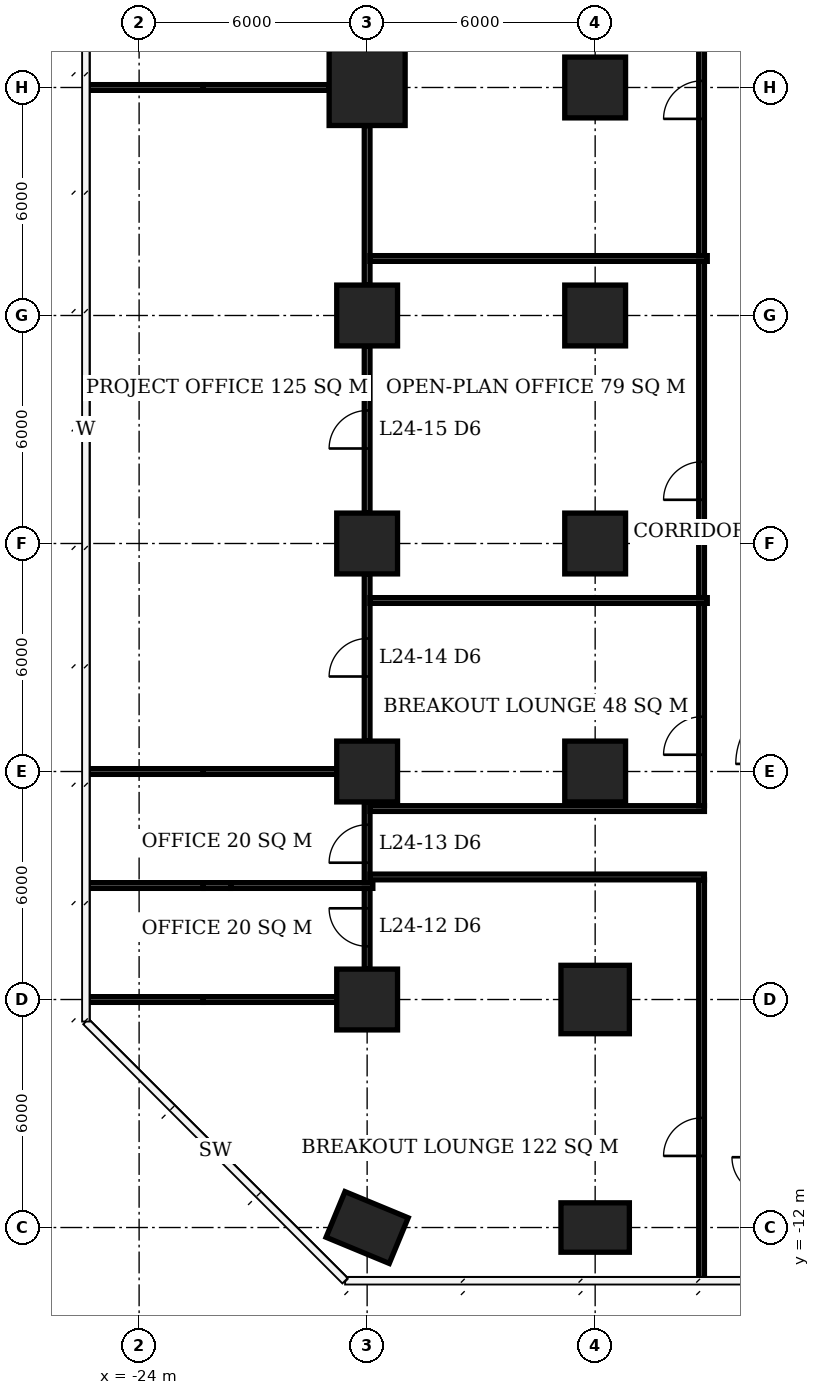
"""IFC4 building model, lengths in metres.
Left out: names, types, materials, properties, quantities, classifications, styles, units other than length and angle.
Written with IfcOpenShell. Run it as: python <this file> out.ifc"""

import sys

from ifc_helpers import new_model, si_unit, direction, frame, frame_2d, origin, origin_2d, place, context, subcontext, project, spatial, rectangle, extrude, element, fill, save


model = new_model("IFC4")
c1 = context("Model", 3, precision=1e-05, world=origin(), true_north=direction((0.0, 1.0)))
c2 = subcontext(c1, "Body", "Model", "MODEL_VIEW")
j1 = project(units=[si_unit("LENGTHUNIT", "METRE"), si_unit("PLANEANGLEUNIT", "RADIAN")], contexts=[c1])
p1 = place(None, origin())
s1 = spatial("IfcSite", under=j1, at=p1, CompositionType="ELEMENT")
p2 = place(p1, origin())
s2 = spatial("IfcBuilding", under=s1, at=p2, CompositionType="ELEMENT")
p3 = place(p2, frame((0.0, 0.0, 101.6)))
s3 = spatial("IfcBuildingStorey", under=s2, at=p3, CompositionType="ELEMENT", Elevation=101.6)
p4 = place(p3, frame((-18.0, -12.0, 0.0), z_axis=(0.0, 0.0, 1.0), x_axis=(-0.923879532511, 0.382683432365, 0.0)))
e1 = element("IfcColumn", 1, at=p4, inside=s3, PredefinedType="COLUMN", context=c2, shape_type="SweptSolid", body=[
    extrude(rectangle(XDim=1.8, YDim=1.3, at=origin_2d()), origin(), (0.0, 0.0, 1.0), 3.9),
])
for number, where, z_axis, x_axis in (
    (2, (-18.0, -6.0, 0.0), (0.0, 0.0, 1.0), (1.0, 0.0, 0.0)),
    (3, (-18.0, 0.0, 0.0), (0.0, 0.0, 1.0), (1.0, 0.0, 0.0)),
    (4, (-18.0, 6.0, 0.0), (0.0, 0.0, 1.0), (1.0, 0.0, 0.0)),
    (5, (-18.0, 12.0, 0.0), (0.0, 0.0, 1.0), (1.0, 0.0, 0.0)),
):
    element("IfcColumn", number, at=place(p3, frame(where, z_axis=z_axis, x_axis=x_axis)), inside=s3, PredefinedType="COLUMN", context=c2, shape_type="SweptSolid", body=[
        extrude(rectangle(XDim=1.6, YDim=1.6, at=origin_2d()), origin(), (0.0, 0.0, 1.0), 3.9),
    ])
p5 = place(p3, frame((-18.0, 18.0, 0.0), z_axis=(0.0, 0.0, 1.0), x_axis=(1.0, 0.0, 0.0)))
e6 = element("IfcColumn", 6, at=p5, inside=s3, PredefinedType="COLUMN", context=c2, shape_type="SweptSolid", body=[
    extrude(rectangle(XDim=2.0, YDim=2.0, at=origin_2d()), origin(), (0.0, 0.0, 1.0), 3.9),
])
p6 = place(p3, frame((-12.0, -12.0, 0.0), z_axis=(0.0, 0.0, 1.0), x_axis=(1.0, 0.0, 0.0)))
e7 = element("IfcColumn", 7, at=p6, inside=s3, PredefinedType="COLUMN", context=c2, shape_type="SweptSolid", body=[
    extrude(rectangle(XDim=1.8, YDim=1.3, at=origin_2d()), origin(), (0.0, 0.0, 1.0), 3.9),
])
p7 = place(p3, frame((-12.0, -6.0, 0.0), z_axis=(0.0, 0.0, 1.0), x_axis=(1.0, 0.0, 0.0)))
e8 = element("IfcColumn", 8, at=p7, inside=s3, PredefinedType="COLUMN", context=c2, shape_type="SweptSolid", body=[
    extrude(rectangle(XDim=1.8, YDim=1.8, at=origin_2d()), origin(), (0.0, 0.0, 1.0), 3.9),
])
for number, where, z_axis, x_axis in (
    (9, (-12.0, 0.0, 0.0), (0.0, 0.0, 1.0), (1.0, 0.0, 0.0)),
    (10, (-12.0, 6.0, 0.0), (0.0, 0.0, 1.0), (1.0, 0.0, 0.0)),
    (11, (-12.0, 12.0, 0.0), (0.0, 0.0, 1.0), (1.0, 0.0, 0.0)),
    (12, (-12.0, 18.0, 0.0), (0.0, 0.0, 1.0), (1.0, 0.0, 0.0)),
):
    element("IfcColumn", number, at=place(p3, frame(where, z_axis=z_axis, x_axis=x_axis)), inside=s3, PredefinedType="COLUMN", context=c2, shape_type="SweptSolid", body=[
        extrude(rectangle(XDim=1.6, YDim=1.6, at=origin_2d()), origin(), (0.0, 0.0, 1.0), 3.9),
    ])
p8 = place(p3, frame((-25.4, -6.0, 0.0), z_axis=(0.0, 0.0, 1.0), x_axis=(1.0, 0.0, 0.0)))
e13 = element("IfcWall", 13, at=p8, inside=s3, PredefinedType="PARTITIONING", context=c2, shape_type="SweptSolid", body=[
    extrude(rectangle(XDim=3.09, YDim=0.15, at=frame_2d((1.545, 0.0))), origin(), (0.0, 0.0, 1.0), 3.65),
])
p9 = place(p3, frame((-22.31, -6.0, 0.0), z_axis=(0.0, 0.0, 1.0), x_axis=(1.0, 0.0, 0.0)))
e14 = element("IfcWall", 14, at=p9, inside=s3, PredefinedType="PARTITIONING", context=c2, shape_type="SweptSolid", body=[
    extrude(rectangle(XDim=3.51, YDim=0.15, at=frame_2d((1.755, 0.0))), origin(), (0.0, 0.0, 1.0), 2.65),
])
p10 = place(p3, frame((-25.4, -3.0, 0.0), z_axis=(0.0, 0.0, 1.0), x_axis=(1.0, 0.0, 0.0)))
e15 = element("IfcWall", 15, at=p10, inside=s3, PredefinedType="PARTITIONING", context=c2, shape_type="SweptSolid", body=[
    extrude(rectangle(XDim=3.09, YDim=0.15, at=frame_2d((1.545, 0.0))), origin(), (0.0, 0.0, 1.0), 3.65),
])
p11 = place(p3, frame((-22.31, -3.0, 0.0), z_axis=(0.0, 0.0, 1.0), x_axis=(1.0, 0.0, 0.0)))
e16 = element("IfcWall", 16, at=p11, inside=s3, PredefinedType="PARTITIONING", context=c2, shape_type="SweptSolid", body=[
    extrude(rectangle(XDim=0.72, YDim=0.15, at=frame_2d((0.36, 0.0))), origin(), (0.0, 0.0, 1.0), 2.65),
])
p12 = place(p3, frame((-21.59, -3.0, 0.0), z_axis=(0.0, 0.0, 1.0), x_axis=(1.0, 0.0, 0.0)))
e17 = element("IfcWall", 17, at=p12, inside=s3, PredefinedType="PARTITIONING", context=c2, shape_type="SweptSolid", body=[
    extrude(rectangle(XDim=3.74, YDim=0.15, at=frame_2d((1.87, 0.0))), origin(), (0.0, 0.0, 1.0), 3.65),
])
p13 = place(p3, frame((-25.4, 0.0, 0.0), z_axis=(0.0, 0.0, 1.0), x_axis=(1.0, 0.0, 0.0)))
e18 = element("IfcWall", 18, at=p13, inside=s3, PredefinedType="PARTITIONING", context=c2, shape_type="SweptSolid", body=[
    extrude(rectangle(XDim=3.09, YDim=0.15, at=frame_2d((1.545, 0.0))), origin(), (0.0, 0.0, 1.0), 3.65),
])
p14 = place(p3, frame((-22.31, 0.0, 0.0), z_axis=(0.0, 0.0, 1.0), x_axis=(1.0, 0.0, 0.0)))
e19 = element("IfcWall", 19, at=p14, inside=s3, PredefinedType="PARTITIONING", context=c2, shape_type="SweptSolid", body=[
    extrude(rectangle(XDim=3.51, YDim=0.15, at=frame_2d((1.755, 0.0))), origin(), (0.0, 0.0, 1.0), 2.65),
])
p15 = place(p3, frame((-25.4, 18.0, 0.0), z_axis=(0.0, 0.0, 1.0), x_axis=(1.0, 0.0, 0.0)))
e20 = element("IfcWall", 20, at=p15, inside=s3, PredefinedType="PARTITIONING", context=c2, shape_type="SweptSolid", body=[
    extrude(rectangle(XDim=3.09, YDim=0.15, at=frame_2d((1.545, 0.0))), origin(), (0.0, 0.0, 1.0), 3.65),
])
p16 = place(p3, frame((-22.31, 18.0, 0.0), z_axis=(0.0, 0.0, 1.0), x_axis=(1.0, 0.0, 0.0)))
e21 = element("IfcWall", 21, at=p16, inside=s3, PredefinedType="PARTITIONING", context=c2, shape_type="SweptSolid", body=[
    extrude(rectangle(XDim=3.31, YDim=0.15, at=frame_2d((1.655, 0.0))), origin(), (0.0, 0.0, 1.0), 2.65),
])
p17 = place(p3, frame((-18.0, -5.2, 0.0), z_axis=(0.0, 0.0, 1.0), x_axis=(0.0, 1.0, 0.0)))
e22 = element("IfcWall", 22, at=p17, inside=s3, PredefinedType="PARTITIONING", context=c2, shape_type="SweptSolid", body=[
    extrude(rectangle(XDim=2.125, YDim=0.15, at=frame_2d((1.062, 0.0))), origin(), (0.0, 0.0, 1.0), 3.65),
])
p18 = place(p17, frame((0.6, 0.0, 0.0)))
e23 = element("IfcOpeningElement", 23, at=p18, cuts=e22, PredefinedType="OPENING", context=c2, shape_type="SweptSolid", body=[
    extrude(rectangle(XDim=1.0, YDim=2.1, at=frame_2d((0.5, 1.05))), frame((0.0, 0.085, 0.0), z_axis=(0.0, -1.0, 0.0), x_axis=(1.0, 0.0, 0.0)), (0.0, 0.0, 1.0), 0.17),
])
p19 = place(p3, frame((-18.0, -2.925, 0.0), z_axis=(0.0, 0.0, 1.0), x_axis=(0.0, 1.0, 0.0)))
e24 = element("IfcWall", 24, at=p19, inside=s3, PredefinedType="PARTITIONING", context=c2, shape_type="SweptSolid", body=[
    extrude(rectangle(XDim=2.125, YDim=0.15, at=frame_2d((1.062, 0.0))), origin(), (0.0, 0.0, 1.0), 3.65),
])
p20 = place(p19, frame((0.525, 0.0, 0.0)))
e25 = element("IfcOpeningElement", 25, at=p20, cuts=e24, PredefinedType="OPENING", context=c2, shape_type="SweptSolid", body=[
    extrude(rectangle(XDim=1.0, YDim=2.1, at=frame_2d((0.5, 1.05))), frame((0.0, 0.085, 0.0), z_axis=(0.0, -1.0, 0.0), x_axis=(1.0, 0.0, 0.0)), (0.0, 0.0, 1.0), 0.17),
])
p21 = place(p3, frame((-18.0, 0.8, 0.0), z_axis=(0.0, 0.0, 1.0), x_axis=(0.0, 1.0, 0.0)))
e26 = element("IfcWall", 26, at=p21, inside=s3, PredefinedType="PARTITIONING", context=c2, shape_type="SweptSolid", body=[
    extrude(rectangle(XDim=4.4, YDim=0.15, at=frame_2d((2.2, 0.0))), origin(), (0.0, 0.0, 1.0), 3.65),
])
p22 = place(p21, frame((1.7, 0.0, 0.0)))
e27 = element("IfcOpeningElement", 27, at=p22, cuts=e26, PredefinedType="OPENING", context=c2, shape_type="SweptSolid", body=[
    extrude(rectangle(XDim=1.0, YDim=2.1, at=frame_2d((0.5, 1.05))), frame((0.0, 0.085, 0.0), z_axis=(0.0, -1.0, 0.0), x_axis=(1.0, 0.0, 0.0)), (0.0, 0.0, 1.0), 0.17),
])
p23 = place(p3, frame((-18.0, 6.8, 0.0), z_axis=(0.0, 0.0, 1.0), x_axis=(0.0, 1.0, 0.0)))
e28 = element("IfcWall", 28, at=p23, inside=s3, PredefinedType="PARTITIONING", context=c2, shape_type="SweptSolid", body=[
    extrude(rectangle(XDim=4.4, YDim=0.15, at=frame_2d((2.2, 0.0))), origin(), (0.0, 0.0, 1.0), 3.65),
])
p24 = place(p23, frame((1.7, 0.0, 0.0)))
e29 = element("IfcOpeningElement", 29, at=p24, cuts=e28, PredefinedType="OPENING", context=c2, shape_type="SweptSolid", body=[
    extrude(rectangle(XDim=1.0, YDim=2.1, at=frame_2d((0.5, 1.05))), frame((0.0, 0.085, 0.0), z_axis=(0.0, -1.0, 0.0), x_axis=(1.0, 0.0, 0.0)), (0.0, 0.0, 1.0), 0.17),
])
p25 = place(p3, frame((-18.0, 12.8, 0.0), z_axis=(0.0, 0.0, 1.0), x_axis=(0.0, 1.0, 0.0)))
e30 = element("IfcWall", 30, at=p25, inside=s3, PredefinedType="PARTITIONING", context=c2, shape_type="SweptSolid", body=[
    extrude(rectangle(XDim=4.2, YDim=0.15, at=frame_2d((2.1, 0.0))), origin(), (0.0, 0.0, 1.0), 3.65),
])
for number, where, z_axis, x_axis in (
    (31, (-17.925, -2.775, 0.0), (0.0, 0.0, 1.0), (1.0, 0.0, 0.0)),
    (32, (-17.925, -0.975, 0.0), (0.0, 0.0, 1.0), (1.0, 0.0, 0.0)),
):
    element("IfcWall", number, at=place(p3, frame(where, z_axis=z_axis, x_axis=x_axis)), inside=s3, PredefinedType="PARTITIONING", context=c2, shape_type="SweptSolid", body=[
        extrude(rectangle(XDim=8.8, YDim=0.15, at=frame_2d((4.4, 0.0))), origin(), (0.0, 0.0, 1.0), 3.65),
    ])
for number, where, z_axis, x_axis in (
    (33, (-17.925, 4.5, 0.0), (0.0, 0.0, 1.0), (1.0, 0.0, 0.0)),
    (34, (-17.925, 13.5, 0.0), (0.0, 0.0, 1.0), (1.0, 0.0, 0.0)),
):
    element("IfcWall", number, at=place(p3, frame(where, z_axis=z_axis, x_axis=x_axis)), inside=s3, PredefinedType="PARTITIONING", context=c2, shape_type="SweptSolid", body=[
        extrude(rectangle(XDim=8.875, YDim=0.15, at=frame_2d((4.438, 0.0))), origin(), (0.0, 0.0, 1.0), 3.65),
    ])
p26 = place(p3, frame((-9.2, -13.35, 0.0), z_axis=(0.0, 0.0, 1.0), x_axis=(0.0, 1.0, 0.0)))
e35 = element("IfcWall", 35, at=p26, inside=s3, PredefinedType="PARTITIONING", context=c2, shape_type="SweptSolid", body=[
    extrude(rectangle(XDim=10.5, YDim=0.15, at=frame_2d((5.25, 0.0))), origin(), (0.0, 0.0, 1.0), 3.65),
])
p27 = place(p26, frame((3.234, 0.0, 0.0)))
e36 = element("IfcOpeningElement", 36, at=p27, cuts=e35, PredefinedType="OPENING", context=c2, shape_type="SweptSolid", body=[
    extrude(rectangle(XDim=1.0, YDim=2.1, at=frame_2d((0.5, 1.05))), frame((0.0, 0.085, 0.0), z_axis=(0.0, -1.0, 0.0), x_axis=(1.0, 0.0, 0.0)), (0.0, 0.0, 1.0), 0.17),
])
p28 = place(p3, frame((-9.2, -0.9, 0.0), z_axis=(0.0, 0.0, 1.0), x_axis=(0.0, 1.0, 0.0)))
e37 = element("IfcWall", 37, at=p28, inside=s3, PredefinedType="PARTITIONING", context=c2, shape_type="SweptSolid", body=[
    extrude(rectangle(XDim=5.325, YDim=0.15, at=frame_2d((2.663, 0.0))), origin(), (0.0, 0.0, 1.0), 3.65),
])
p29 = place(p28, frame((1.341, 0.0, 0.0)))
e38 = element("IfcOpeningElement", 38, at=p29, cuts=e37, PredefinedType="OPENING", context=c2, shape_type="SweptSolid", body=[
    extrude(rectangle(XDim=1.0, YDim=2.1, at=frame_2d((0.5, 1.05))), frame((0.0, 0.085, 0.0), z_axis=(0.0, -1.0, 0.0), x_axis=(1.0, 0.0, 0.0)), (0.0, 0.0, 1.0), 0.17),
])
p30 = place(p3, frame((-9.2, 4.575, 0.0), z_axis=(0.0, 0.0, 1.0), x_axis=(0.0, 1.0, 0.0)))
e39 = element("IfcWall", 39, at=p30, inside=s3, PredefinedType="PARTITIONING", context=c2, shape_type="SweptSolid", body=[
    extrude(rectangle(XDim=8.85, YDim=0.15, at=frame_2d((4.425, 0.0))), origin(), (0.0, 0.0, 1.0), 3.65),
])
p31 = place(p30, frame((2.575, 0.0, 0.0)))
e40 = element("IfcOpeningElement", 40, at=p31, cuts=e39, PredefinedType="OPENING", context=c2, shape_type="SweptSolid", body=[
    extrude(rectangle(XDim=1.0, YDim=2.1, at=frame_2d((0.5, 1.05))), frame((0.0, 0.085, 0.0), z_axis=(0.0, -1.0, 0.0), x_axis=(1.0, 0.0, 0.0)), (0.0, 0.0, 1.0), 0.17),
])
p32 = place(p3, frame((-9.2, 13.575, 0.0), z_axis=(0.0, 0.0, 1.0), x_axis=(0.0, 1.0, 0.0)))
e41 = element("IfcWall", 41, at=p32, inside=s3, PredefinedType="PARTITIONING", context=c2, shape_type="SweptSolid", body=[
    extrude(rectangle(XDim=11.85, YDim=0.15, at=frame_2d((5.925, 0.0))), origin(), (0.0, 0.0, 1.0), 3.65),
])
p33 = place(p32, frame((3.599, 0.0, 0.0)))
e42 = element("IfcOpeningElement", 42, at=p33, cuts=e41, PredefinedType="OPENING", context=c2, shape_type="SweptSolid", body=[
    extrude(rectangle(XDim=1.0, YDim=2.1, at=frame_2d((0.5, 1.05))), frame((0.0, 0.085, 0.0), z_axis=(0.0, -1.0, 0.0), x_axis=(1.0, 0.0, 0.0)), (0.0, 0.0, 1.0), 0.17),
])
p34 = place(p18, origin())
e43 = element("IfcDoor", 43, at=p34, inside=s3, OperationType="SINGLE_SWING_RIGHT", PredefinedType="DOOR", context=c2, shape_type="SweptSolid", body=[
    extrude(rectangle(XDim=1.0, YDim=2.1, at=frame_2d((0.5, 1.05))), frame((0.0, 0.025, 0.0), z_axis=(0.0, -1.0, 0.0), x_axis=(1.0, 0.0, 0.0)), (0.0, 0.0, 1.0), 0.05),
])
fill(e23, e43)
p35 = place(p20, origin())
e44 = element("IfcDoor", 44, at=p35, inside=s3, OperationType="SINGLE_SWING_LEFT", PredefinedType="DOOR", context=c2, shape_type="SweptSolid", body=[
    extrude(rectangle(XDim=1.0, YDim=2.1, at=frame_2d((0.5, 1.05))), frame((0.0, 0.025, 0.0), z_axis=(0.0, -1.0, 0.0), x_axis=(1.0, 0.0, 0.0)), (0.0, 0.0, 1.0), 0.05),
])
fill(e25, e44)
p36 = place(p22, origin())
e45 = element("IfcDoor", 45, at=p36, inside=s3, OperationType="SINGLE_SWING_LEFT", PredefinedType="DOOR", context=c2, shape_type="SweptSolid", body=[
    extrude(rectangle(XDim=1.0, YDim=2.1, at=frame_2d((0.5, 1.05))), frame((0.0, 0.025, 0.0), z_axis=(0.0, -1.0, 0.0), x_axis=(1.0, 0.0, 0.0)), (0.0, 0.0, 1.0), 0.05),
])
fill(e27, e45)
p37 = place(p24, origin())
e46 = element("IfcDoor", 46, at=p37, inside=s3, OperationType="SINGLE_SWING_LEFT", PredefinedType="DOOR", context=c2, shape_type="SweptSolid", body=[
    extrude(rectangle(XDim=1.0, YDim=2.1, at=frame_2d((0.5, 1.05))), frame((0.0, 0.025, 0.0), z_axis=(0.0, -1.0, 0.0), x_axis=(1.0, 0.0, 0.0)), (0.0, 0.0, 1.0), 0.05),
])
fill(e29, e46)
p38 = place(p27, origin())
e47 = element("IfcDoor", 47, at=p38, inside=s3, OperationType="SINGLE_SWING_LEFT", PredefinedType="DOOR", context=c2, shape_type="SweptSolid", body=[
    extrude(rectangle(XDim=1.0, YDim=2.1, at=frame_2d((0.5, 1.05))), frame((0.0, 0.025, 0.0), z_axis=(0.0, -1.0, 0.0), x_axis=(1.0, 0.0, 0.0)), (0.0, 0.0, 1.0), 0.05),
])
fill(e36, e47)
p39 = place(p31, origin())
e48 = element("IfcDoor", 48, at=p39, inside=s3, OperationType="SINGLE_SWING_LEFT", PredefinedType="DOOR", context=c2, shape_type="SweptSolid", body=[
    extrude(rectangle(XDim=1.0, YDim=2.1, at=frame_2d((0.5, 1.05))), frame((0.0, 0.025, 0.0), z_axis=(0.0, -1.0, 0.0), x_axis=(1.0, 0.0, 0.0)), (0.0, 0.0, 1.0), 0.05),
])
fill(e40, e48)
p40 = place(p33, origin())
e49 = element("IfcDoor", 49, at=p40, inside=s3, OperationType="SINGLE_SWING_LEFT", PredefinedType="DOOR", context=c2, shape_type="SweptSolid", body=[
    extrude(rectangle(XDim=1.0, YDim=2.1, at=frame_2d((0.5, 1.05))), frame((0.0, 0.025, 0.0), z_axis=(0.0, -1.0, 0.0), x_axis=(1.0, 0.0, 0.0)), (0.0, 0.0, 1.0), 0.05),
])
fill(e42, e49)
p41 = place(p29, origin())
e50 = element("IfcDoor", 50, at=p41, inside=s3, OperationType="SINGLE_SWING_LEFT", PredefinedType="DOOR", context=c2, shape_type="SweptSolid", body=[
    extrude(rectangle(XDim=1.0, YDim=2.1, at=frame_2d((0.5, 1.05))), frame((0.0, 0.025, 0.0), z_axis=(0.0, -1.0, 0.0), x_axis=(1.0, 0.0, 0.0)), (0.0, 0.0, 1.0), 0.05),
])
fill(e38, e50)
save(model, sys.argv[1])
